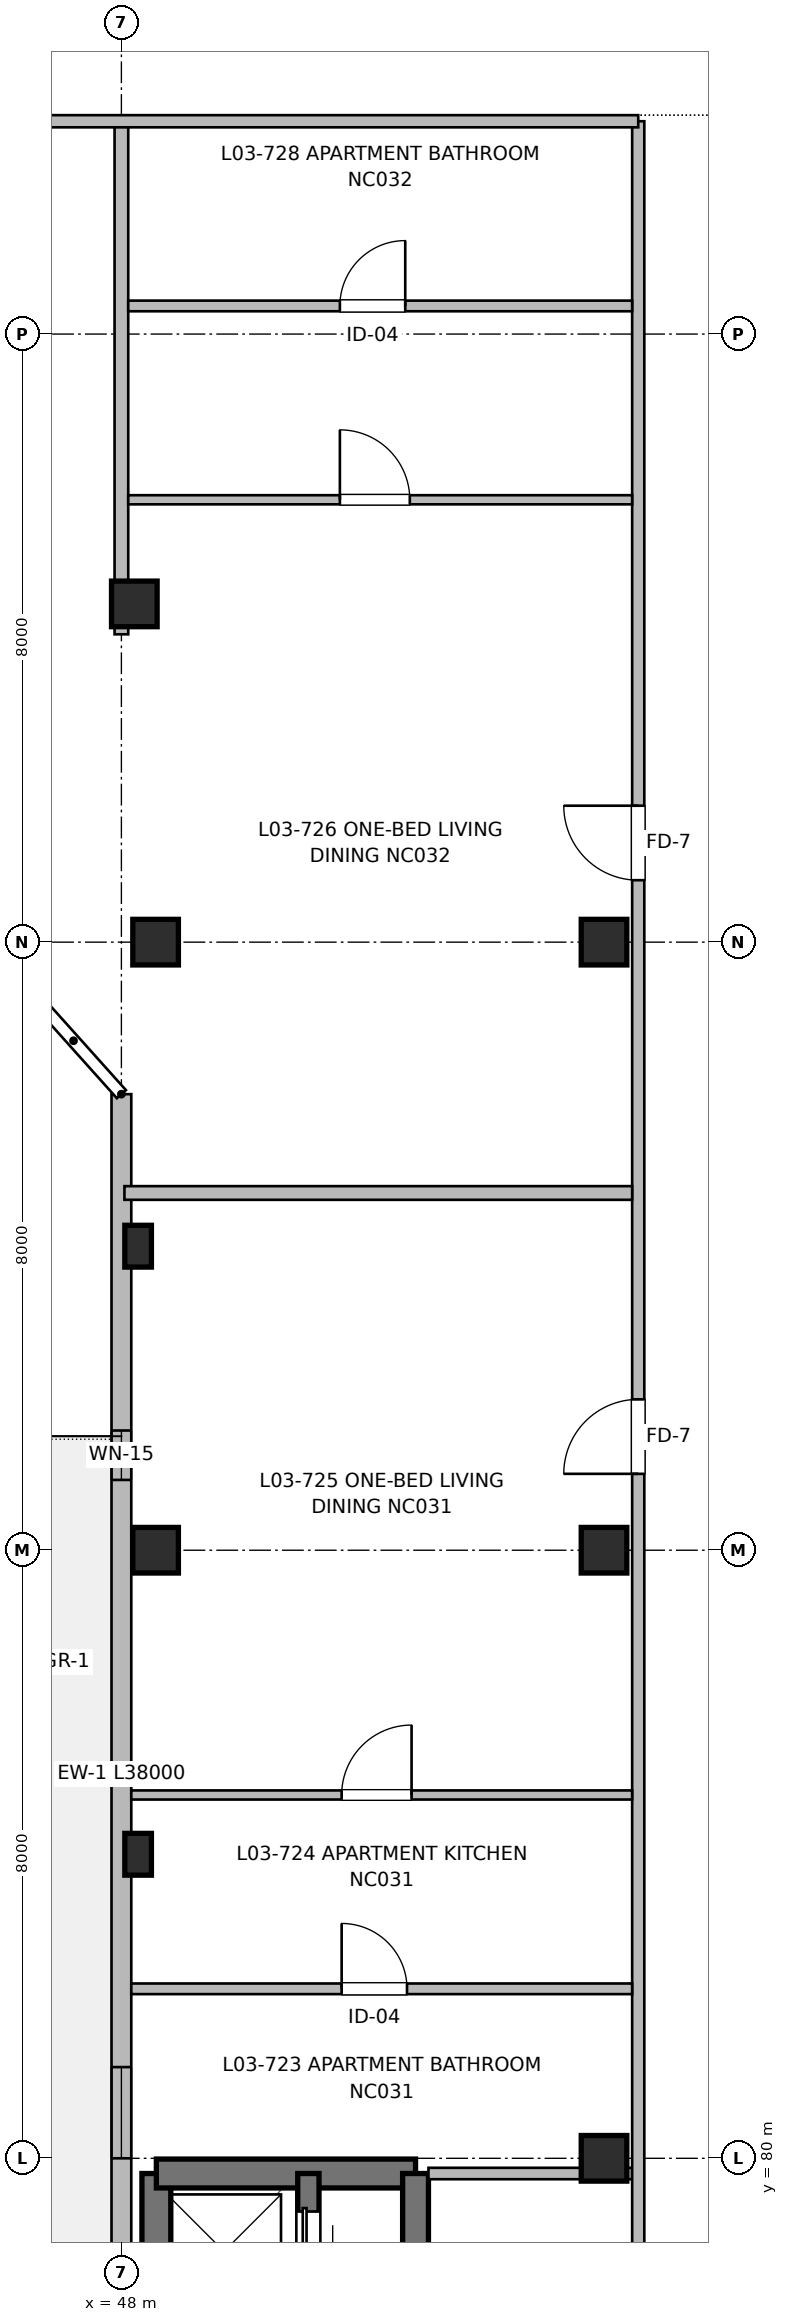
"""IFC4 building model, lengths in metres.
Left out: names, types, materials, properties, quantities, classifications, styles, units other than length and angle.
Written with IfcOpenShell. Run it as: python <this file> out.ifc"""

import sys

from ifc_helpers import new_model, si_unit, direction, frame, frame_2d, origin, origin_2d, place, context, subcontext, project, spatial, rectangle, extrude, element, fill, save


model = new_model("IFC4")
c1 = context("Model", 3, precision=1e-05, world=origin(), true_north=direction((0.0, 1.0)))
c2 = subcontext(c1, "Body", "Model", "MODEL_VIEW")
j1 = project(units=[si_unit("LENGTHUNIT", "METRE"), si_unit("PLANEANGLEUNIT", "RADIAN")], contexts=[c1])
p1 = place(None, origin())
s1 = spatial("IfcSite", under=j1, at=p1, CompositionType="ELEMENT")
p2 = place(p1, origin())
s2 = spatial("IfcBuilding", under=s1, at=p2, CompositionType="ELEMENT")
p3 = place(p2, frame((0.0, 0.0, 10.56)))
s3 = spatial("IfcBuildingStorey", under=s2, at=p3, CompositionType="ELEMENT", Elevation=10.56)
p4 = place(p3, frame((48.17, 100.45, 0.0), z_axis=(0.0, 0.0, 1.0), x_axis=(1.0, 0.0, 0.0)))
e1 = element("IfcColumn", 1, at=p4, inside=s3, PredefinedType="COLUMN", context=c2, shape_type="SweptSolid", body=[
    extrude(rectangle(XDim=0.6, YDim=0.6, at=origin_2d()), origin(), (0.0, 0.0, 1.0), 3.2),
])
for number, where, z_axis, x_axis in (
    (2, (48.22, 84.0, 0.0), (0.0, 0.0, 1.0), (1.0, 0.0, 0.0)),
    (3, (48.22, 92.0, 0.0), (0.0, 0.0, 1.0), (1.0, 0.0, 0.0)),
):
    element("IfcColumn", number, at=place(p3, frame(where, z_axis=z_axis, x_axis=x_axis)), inside=s3, PredefinedType="PILASTER", context=c2, shape_type="SweptSolid", body=[
        extrude(rectangle(XDim=0.35, YDim=0.55, at=origin_2d()), origin(), (0.0, 0.0, 1.0), 3.2),
    ])
for number, where, z_axis, x_axis in (
    (4, (48.45, 88.0, 0.0), (0.0, 0.0, 1.0), (1.0, 0.0, 0.0)),
    (5, (48.45, 96.0, 0.0), (0.0, 0.0, 1.0), (1.0, 0.0, 0.0)),
    (6, (54.35, 80.0, 0.0), (0.0, 0.0, 1.0), (1.0, 0.0, 0.0)),
    (7, (54.35, 88.0, 0.0), (0.0, 0.0, 1.0), (1.0, 0.0, 0.0)),
    (8, (54.35, 96.0, 0.0), (0.0, 0.0, 1.0), (1.0, 0.0, 0.0)),
):
    element("IfcColumn", number, at=place(p3, frame(where, z_axis=z_axis, x_axis=x_axis)), inside=s3, PredefinedType="COLUMN", context=c2, shape_type="SweptSolid", body=[
        extrude(rectangle(XDim=0.6, YDim=0.6, at=origin_2d()), origin(), (0.0, 0.0, 1.0), 3.2),
    ])
p5 = place(p3, frame((48.46, 67.35, 0.0), z_axis=(0.0, 0.0, 1.0), x_axis=(0.0, 1.0, 0.0)))
e9 = element("IfcWall", 9, at=p5, inside=s3, PredefinedType="SHEAR", context=c2, shape_type="SweptSolid", body=[
    extrude(rectangle(XDim=12.45, YDim=0.38, at=frame_2d((6.225, 0.0))), origin(), (0.0, 0.0, 1.0), 3.2),
])
p6 = place(p5, frame((2.2, 0.0, 0.97)))
e10 = element("IfcOpeningElement", 10, at=p6, cuts=e9, PredefinedType="OPENING", context=c2, shape_type="SweptSolid", body=[
    extrude(rectangle(XDim=0.95, YDim=1.25, at=frame_2d((0.475, 0.625))), frame((0.0, 0.2, 0.0), z_axis=(0.0, -1.0, 0.0), x_axis=(1.0, 0.0, 0.0)), (0.0, 0.0, 1.0), 0.4),
])
p7 = place(p3, frame((48.46, 79.8, 0.0), z_axis=(0.0, 0.0, 1.0), x_axis=(1.0, 0.0, 0.0)))
e11 = element("IfcWall", 11, at=p7, inside=s3, PredefinedType="SHEAR", context=c2, shape_type="SweptSolid", body=[
    extrude(rectangle(XDim=3.41, YDim=0.38, at=frame_2d((1.705, 0.0))), origin(), (0.0, 0.0, 1.0), 3.2),
])
p8 = place(p3, frame((51.87, 79.8, 0.0), z_axis=(0.0, 0.0, 1.0), x_axis=(0.0, -1.0, 0.0)))
e12 = element("IfcWall", 12, at=p8, inside=s3, PredefinedType="SHEAR", context=c2, shape_type="SweptSolid", body=[
    extrude(rectangle(XDim=12.45, YDim=0.34, at=frame_2d((6.225, 0.0))), origin(), (0.0, 0.0, 1.0), 3.2),
])
p9 = place(p8, frame((10.85, 0.0, 0.0)))
e13 = element("IfcOpeningElement", 13, at=p9, cuts=e12, PredefinedType="OPENING", context=c2, shape_type="SweptSolid", body=[
    extrude(rectangle(XDim=1.05, YDim=2.15, at=frame_2d((0.525, 1.075))), frame((0.0, 0.18, 0.0), z_axis=(0.0, -1.0, 0.0), x_axis=(1.0, 0.0, 0.0)), (0.0, 0.0, 1.0), 0.36),
])
p10 = place(p3, frame((50.46, 74.55, 0.0), z_axis=(0.0, 0.0, 1.0), x_axis=(0.0, 1.0, 0.0)))
e14 = element("IfcWall", 14, at=p10, inside=s3, PredefinedType="SHEAR", context=c2, shape_type="SweptSolid", body=[
    extrude(rectangle(XDim=5.25, YDim=0.28, at=frame_2d((2.625, 0.0))), origin(), (0.0, 0.0, 1.0), 3.2),
])
p11 = place(p10, frame((1.15, 0.0, 0.0)))
e15 = element("IfcOpeningElement", 15, at=p11, cuts=e14, PredefinedType="OPENING", context=c2, shape_type="SweptSolid", body=[
    extrude(rectangle(XDim=1.0, YDim=2.15, at=frame_2d((0.5, 1.075))), frame((0.0, 0.15, 0.0), z_axis=(0.0, -1.0, 0.0), x_axis=(1.0, 0.0, 0.0)), (0.0, 0.0, 1.0), 0.3),
])
p12 = place(p10, frame((3.85, 0.0, 0.0)))
e16 = element("IfcOpeningElement", 16, at=p12, cuts=e14, PredefinedType="OPENING", context=c2, shape_type="SweptSolid", body=[
    extrude(rectangle(XDim=0.9, YDim=2.15, at=frame_2d((0.45, 1.075))), frame((0.0, 0.15, 0.0), z_axis=(0.0, -1.0, 0.0), x_axis=(1.0, 0.0, 0.0)), (0.0, 0.0, 1.0), 0.3),
])
p13 = place(p3, frame((48.0, 56.0, 0.0), z_axis=(0.0, 0.0, 1.0), x_axis=(0.0, 1.0, 0.0)))
e17 = element("IfcWall", 17, at=p13, inside=s3, PredefinedType="SOLIDWALL", context=c2, shape_type="SweptSolid", body=[
    extrude(rectangle(XDim=38.0, YDim=0.26, at=frame_2d((19.0, 0.0))), origin(), (0.0, 0.0, 1.0), 2.98),
])
p14 = place(p13, frame((4.95, 0.0, 0.0)))
e18 = element("IfcOpeningElement", 18, at=p14, cuts=e17, PredefinedType="OPENING", context=c2, shape_type="SweptSolid", body=[
    extrude(rectangle(XDim=1.2, YDim=2.2, at=frame_2d((0.6, 1.1))), frame((0.0, 0.14, 0.0), z_axis=(0.0, -1.0, 0.0), x_axis=(1.0, 0.0, 0.0)), (0.0, 0.0, 1.0), 0.28),
])
p15 = place(p13, frame((13.725, 0.0, 0.9)))
e19 = element("IfcOpeningElement", 19, at=p15, cuts=e17, PredefinedType="OPENING", context=c2, shape_type="SweptSolid", body=[
    extrude(rectangle(XDim=1.05, YDim=1.15, at=frame_2d((0.525, 0.575))), frame((0.0, 0.14, 0.0), z_axis=(0.0, -1.0, 0.0), x_axis=(1.0, 0.0, 0.0)), (0.0, 0.0, 1.0), 0.28),
])
p16 = place(p13, frame((24.0, 0.0, 0.9)))
e20 = element("IfcOpeningElement", 20, at=p16, cuts=e17, PredefinedType="OPENING", context=c2, shape_type="SweptSolid", body=[
    extrude(rectangle(XDim=1.2, YDim=1.05, at=frame_2d((0.6, 0.525))), frame((0.0, 0.14, 0.0), z_axis=(0.0, -1.0, 0.0), x_axis=(1.0, 0.0, 0.0)), (0.0, 0.0, 1.0), 0.28),
])
p17 = place(p13, frame((32.925, 0.0, 0.9)))
e21 = element("IfcOpeningElement", 21, at=p17, cuts=e17, PredefinedType="OPENING", context=c2, shape_type="SweptSolid", body=[
    extrude(rectangle(XDim=0.65, YDim=0.95, at=frame_2d((0.325, 0.475))), frame((0.0, 0.14, 0.0), z_axis=(0.0, -1.0, 0.0), x_axis=(1.0, 0.0, 0.0)), (0.0, 0.0, 1.0), 0.28),
])
p18 = place(p3, frame((52.04, 79.8, 0.0), z_axis=(0.0, 0.0, 1.0), x_axis=(1.0, 0.0, 0.0)))
e22 = element("IfcWall", 22, at=p18, inside=s3, PredefinedType="PARTITIONING", context=c2, shape_type="SweptSolid", body=[
    extrude(rectangle(XDim=2.68, YDim=0.15, at=frame_2d((1.34, 0.0))), origin(), (0.0, 0.0, 1.0), 2.935),
])
p19 = place(p3, frame((54.8, 56.18, 0.0), z_axis=(0.0, 0.0, 1.0), x_axis=(0.0, 1.0, 0.0)))
e23 = element("IfcWall", 23, at=p19, inside=s3, PredefinedType="PARTITIONING", context=c2, shape_type="SweptSolid", body=[
    extrude(rectangle(XDim=50.62, YDim=0.16, at=frame_2d((25.31, 0.0))), origin(), (0.0, 0.0, 1.0), 2.935),
])
p20 = place(p19, frame((12.82, 0.0, 0.0)))
e24 = element("IfcOpeningElement", 24, at=p20, cuts=e23, PredefinedType="OPENING", context=c2, shape_type="SweptSolid", body=[
    extrude(rectangle(XDim=1.1, YDim=2.15, at=frame_2d((0.55, 1.075))), frame((0.0, 0.09, 0.0), z_axis=(0.0, -1.0, 0.0), x_axis=(1.0, 0.0, 0.0)), (0.0, 0.0, 1.0), 0.18),
])
p21 = place(p19, frame((19.22, 0.0, 0.0)))
e25 = element("IfcOpeningElement", 25, at=p21, cuts=e23, PredefinedType="OPENING", context=c2, shape_type="SweptSolid", body=[
    extrude(rectangle(XDim=1.6, YDim=2.15, at=frame_2d((0.8, 1.075))), frame((0.0, 0.09, 0.0), z_axis=(0.0, -1.0, 0.0), x_axis=(1.0, 0.0, 0.0)), (0.0, 0.0, 1.0), 0.18),
])
p22 = place(p19, frame((1.8, 0.0, 0.0)))
e26 = element("IfcOpeningElement", 26, at=p22, cuts=e23, PredefinedType="OPENING", context=c2, shape_type="SweptSolid", body=[
    extrude(rectangle(XDim=0.96, YDim=2.15, at=frame_2d((0.48, 1.075))), frame((0.0, 0.09, 0.0), z_axis=(0.0, -1.0, 0.0), x_axis=(1.0, 0.0, 0.0)), (0.0, 0.0, 1.0), 0.18),
])
p23 = place(p19, frame((32.825, 0.0, 0.0)))
e27 = element("IfcOpeningElement", 27, at=p23, cuts=e23, PredefinedType="OPENING", context=c2, shape_type="SweptSolid", body=[
    extrude(rectangle(XDim=0.98, YDim=2.15, at=frame_2d((0.49, 1.075))), frame((0.0, 0.09, 0.0), z_axis=(0.0, -1.0, 0.0), x_axis=(1.0, 0.0, 0.0)), (0.0, 0.0, 1.0), 0.18),
])
p24 = place(p19, frame((40.635, 0.0, 0.0)))
e28 = element("IfcOpeningElement", 28, at=p24, cuts=e23, PredefinedType="OPENING", context=c2, shape_type="SweptSolid", body=[
    extrude(rectangle(XDim=0.98, YDim=2.15, at=frame_2d((0.49, 1.075))), frame((0.0, 0.09, 0.0), z_axis=(0.0, -1.0, 0.0), x_axis=(1.0, 0.0, 0.0)), (0.0, 0.0, 1.0), 0.18),
])
p25 = place(p3, frame((39.68, 106.8, 0.0), z_axis=(0.0, 0.0, 1.0), x_axis=(1.0, 0.0, 0.0)))
e29 = element("IfcWall", 29, at=p25, inside=s3, PredefinedType="PARTITIONING", context=c2, shape_type="SweptSolid", body=[
    extrude(rectangle(XDim=15.12, YDim=0.16, at=frame_2d((7.56, 0.0))), origin(), (0.0, 0.0, 1.0), 2.935),
])
p26 = place(p3, frame((48.0, 100.05, 0.0), z_axis=(0.0, 0.0, 1.0), x_axis=(0.0, 1.0, 0.0)))
e30 = element("IfcWall", 30, at=p26, inside=s3, PredefinedType="PARTITIONING", context=c2, shape_type="SweptSolid", body=[
    extrude(rectangle(XDim=6.67, YDim=0.18, at=frame_2d((3.335, 0.0))), origin(), (0.0, 0.0, 1.0), 2.68),
])
p27 = place(p3, frame((48.04, 92.7, 0.0), z_axis=(0.0, 0.0, 1.0), x_axis=(1.0, 0.0, 0.0)))
e31 = element("IfcWall", 31, at=p27, inside=s3, PredefinedType="PARTITIONING", context=c2, shape_type="SweptSolid", body=[
    extrude(rectangle(XDim=6.68, YDim=0.18, at=frame_2d((3.34, 0.0))), origin(), (0.0, 0.0, 1.0), 2.935),
])
p28 = place(p3, frame((48.13, 82.23, 0.0), z_axis=(0.0, 0.0, 1.0), x_axis=(1.0, 0.0, 0.0)))
e32 = element("IfcWall", 32, at=p28, inside=s3, PredefinedType="PARTITIONING", context=c2, shape_type="SweptSolid", body=[
    extrude(rectangle(XDim=6.59, YDim=0.14, at=frame_2d((3.295, 0.0))), origin(), (0.0, 0.0, 1.0), 2.935),
])
p29 = place(p28, frame((2.768, 0.0, 0.0)))
e33 = element("IfcOpeningElement", 33, at=p29, cuts=e32, PredefinedType="OPENING", context=c2, shape_type="SweptSolid", body=[
    extrude(rectangle(XDim=0.86, YDim=2.1, at=frame_2d((0.43, 1.05))), frame((0.0, 0.08, 0.0), z_axis=(0.0, -1.0, 0.0), x_axis=(1.0, 0.0, 0.0)), (0.0, 0.0, 1.0), 0.16),
])
p30 = place(p3, frame((48.13, 84.78, 0.0), z_axis=(0.0, 0.0, 1.0), x_axis=(1.0, 0.0, 0.0)))
e34 = element("IfcWall", 34, at=p30, inside=s3, PredefinedType="PARTITIONING", context=c2, shape_type="SweptSolid", body=[
    extrude(rectangle(XDim=6.59, YDim=0.12, at=frame_2d((3.295, 0.0))), origin(), (0.0, 0.0, 1.0), 2.935),
])
p31 = place(p30, frame((2.768, 0.0, 0.0)))
e35 = element("IfcOpeningElement", 35, at=p31, cuts=e34, PredefinedType="OPENING", context=c2, shape_type="SweptSolid", body=[
    extrude(rectangle(XDim=0.92, YDim=2.1, at=frame_2d((0.46, 1.05))), frame((0.0, 0.07, 0.0), z_axis=(0.0, -1.0, 0.0), x_axis=(1.0, 0.0, 0.0)), (0.0, 0.0, 1.0), 0.14),
])
p32 = place(p3, frame((48.09, 101.82, 0.0), z_axis=(0.0, 0.0, 1.0), x_axis=(1.0, 0.0, 0.0)))
e36 = element("IfcWall", 36, at=p32, inside=s3, PredefinedType="PARTITIONING", context=c2, shape_type="SweptSolid", body=[
    extrude(rectangle(XDim=6.63, YDim=0.12, at=frame_2d((3.315, 0.0))), origin(), (0.0, 0.0, 1.0), 2.935),
])
p33 = place(p32, frame((2.785, 0.0, 0.0)))
e37 = element("IfcOpeningElement", 37, at=p33, cuts=e36, PredefinedType="OPENING", context=c2, shape_type="SweptSolid", body=[
    extrude(rectangle(XDim=0.92, YDim=2.1, at=frame_2d((0.46, 1.05))), frame((0.0, 0.07, 0.0), z_axis=(0.0, -1.0, 0.0), x_axis=(1.0, 0.0, 0.0)), (0.0, 0.0, 1.0), 0.14),
])
p34 = place(p3, frame((48.09, 104.37, 0.0), z_axis=(0.0, 0.0, 1.0), x_axis=(1.0, 0.0, 0.0)))
e38 = element("IfcWall", 38, at=p34, inside=s3, PredefinedType="PARTITIONING", context=c2, shape_type="SweptSolid", body=[
    extrude(rectangle(XDim=6.63, YDim=0.14, at=frame_2d((3.315, 0.0))), origin(), (0.0, 0.0, 1.0), 2.935),
])
p35 = place(p34, frame((2.785, 0.0, 0.0)))
e39 = element("IfcOpeningElement", 39, at=p35, cuts=e38, PredefinedType="OPENING", context=c2, shape_type="SweptSolid", body=[
    extrude(rectangle(XDim=0.86, YDim=2.1, at=frame_2d((0.43, 1.05))), frame((0.0, 0.08, 0.0), z_axis=(0.0, -1.0, 0.0), x_axis=(1.0, 0.0, 0.0)), (0.0, 0.0, 1.0), 0.16),
])
p36 = place(p12, origin())
e40 = element("IfcDoor", 40, at=p36, inside=s3, OperationType="SLIDING_TO_RIGHT", PredefinedType="DOOR", context=c2, shape_type="SweptSolid", body=[
    extrude(rectangle(XDim=0.9, YDim=2.15, at=frame_2d((0.45, 1.075))), frame((0.0, 0.025, 0.0), z_axis=(0.0, -1.0, 0.0), x_axis=(1.0, 0.0, 0.0)), (0.0, 0.0, 1.0), 0.05),
])
fill(e16, e40)
p37 = place(p16, origin())
e41 = element("IfcWindow", 41, at=p37, inside=s3, PartitioningType="SINGLE_PANEL", PredefinedType="WINDOW", context=c2, shape_type="SweptSolid", body=[
    extrude(rectangle(XDim=1.2, YDim=1.05, at=frame_2d((0.6, 0.525))), frame((0.0, 0.03, 0.0), z_axis=(0.0, -1.0, 0.0), x_axis=(1.0, 0.0, 0.0)), (0.0, 0.0, 1.0), 0.06),
])
fill(e20, e41)
p38 = place(p17, origin())
e42 = element("IfcWindow", 42, at=p38, inside=s3, PartitioningType="SINGLE_PANEL", PredefinedType="WINDOW", context=c2, shape_type="SweptSolid", body=[
    extrude(rectangle(XDim=0.65, YDim=0.95, at=frame_2d((0.325, 0.475))), frame((0.0, 0.03, 0.0), z_axis=(0.0, -1.0, 0.0), x_axis=(1.0, 0.0, 0.0)), (0.0, 0.0, 1.0), 0.06),
])
fill(e21, e42)
p39 = place(p29, origin())
e43 = element("IfcDoor", 43, at=p39, inside=s3, OperationType="SINGLE_SWING_LEFT", PredefinedType="DOOR", context=c2, shape_type="SweptSolid", body=[
    extrude(rectangle(XDim=0.86, YDim=2.1, at=frame_2d((0.43, 1.05))), frame((0.0, 0.025, 0.0), z_axis=(0.0, -1.0, 0.0), x_axis=(1.0, 0.0, 0.0)), (0.0, 0.0, 1.0), 0.05),
])
fill(e33, e43)
p40 = place(p31, origin())
e44 = element("IfcDoor", 44, at=p40, inside=s3, OperationType="SINGLE_SWING_RIGHT", PredefinedType="DOOR", context=c2, shape_type="SweptSolid", body=[
    extrude(rectangle(XDim=0.92, YDim=2.1, at=frame_2d((0.46, 1.05))), frame((0.0, 0.025, 0.0), z_axis=(0.0, -1.0, 0.0), x_axis=(1.0, 0.0, 0.0)), (0.0, 0.0, 1.0), 0.05),
])
fill(e35, e44)
p41 = place(p23, origin())
e45 = element("IfcDoor", 45, at=p41, inside=s3, OperationType="SINGLE_SWING_LEFT", PredefinedType="DOOR", context=c2, shape_type="SweptSolid", body=[
    extrude(rectangle(XDim=0.98, YDim=2.15, at=frame_2d((0.49, 1.075))), frame((0.0, 0.025, 0.0), z_axis=(0.0, -1.0, 0.0), x_axis=(1.0, 0.0, 0.0)), (0.0, 0.0, 1.0), 0.05),
])
fill(e27, e45)
p42 = place(p35, origin())
e46 = element("IfcDoor", 46, at=p42, inside=s3, OperationType="SINGLE_SWING_RIGHT", PredefinedType="DOOR", context=c2, shape_type="SweptSolid", body=[
    extrude(rectangle(XDim=0.86, YDim=2.1, at=frame_2d((0.43, 1.05))), frame((0.0, 0.025, 0.0), z_axis=(0.0, -1.0, 0.0), x_axis=(1.0, 0.0, 0.0)), (0.0, 0.0, 1.0), 0.05),
])
fill(e39, e46)
p43 = place(p33, origin())
e47 = element("IfcDoor", 47, at=p43, inside=s3, OperationType="SINGLE_SWING_LEFT", PredefinedType="DOOR", context=c2, shape_type="SweptSolid", body=[
    extrude(rectangle(XDim=0.92, YDim=2.1, at=frame_2d((0.46, 1.05))), frame((0.0, 0.025, 0.0), z_axis=(0.0, -1.0, 0.0), x_axis=(1.0, 0.0, 0.0)), (0.0, 0.0, 1.0), 0.05),
])
fill(e37, e47)
p44 = place(p24, origin())
e48 = element("IfcDoor", 48, at=p44, inside=s3, OperationType="SINGLE_SWING_RIGHT", PredefinedType="DOOR", context=c2, shape_type="SweptSolid", body=[
    extrude(rectangle(XDim=0.98, YDim=2.15, at=frame_2d((0.49, 1.075))), frame((0.0, 0.025, 0.0), z_axis=(0.0, -1.0, 0.0), x_axis=(1.0, 0.0, 0.0)), (0.0, 0.0, 1.0), 0.05),
])
fill(e28, e48)
save(model, sys.argv[1])
